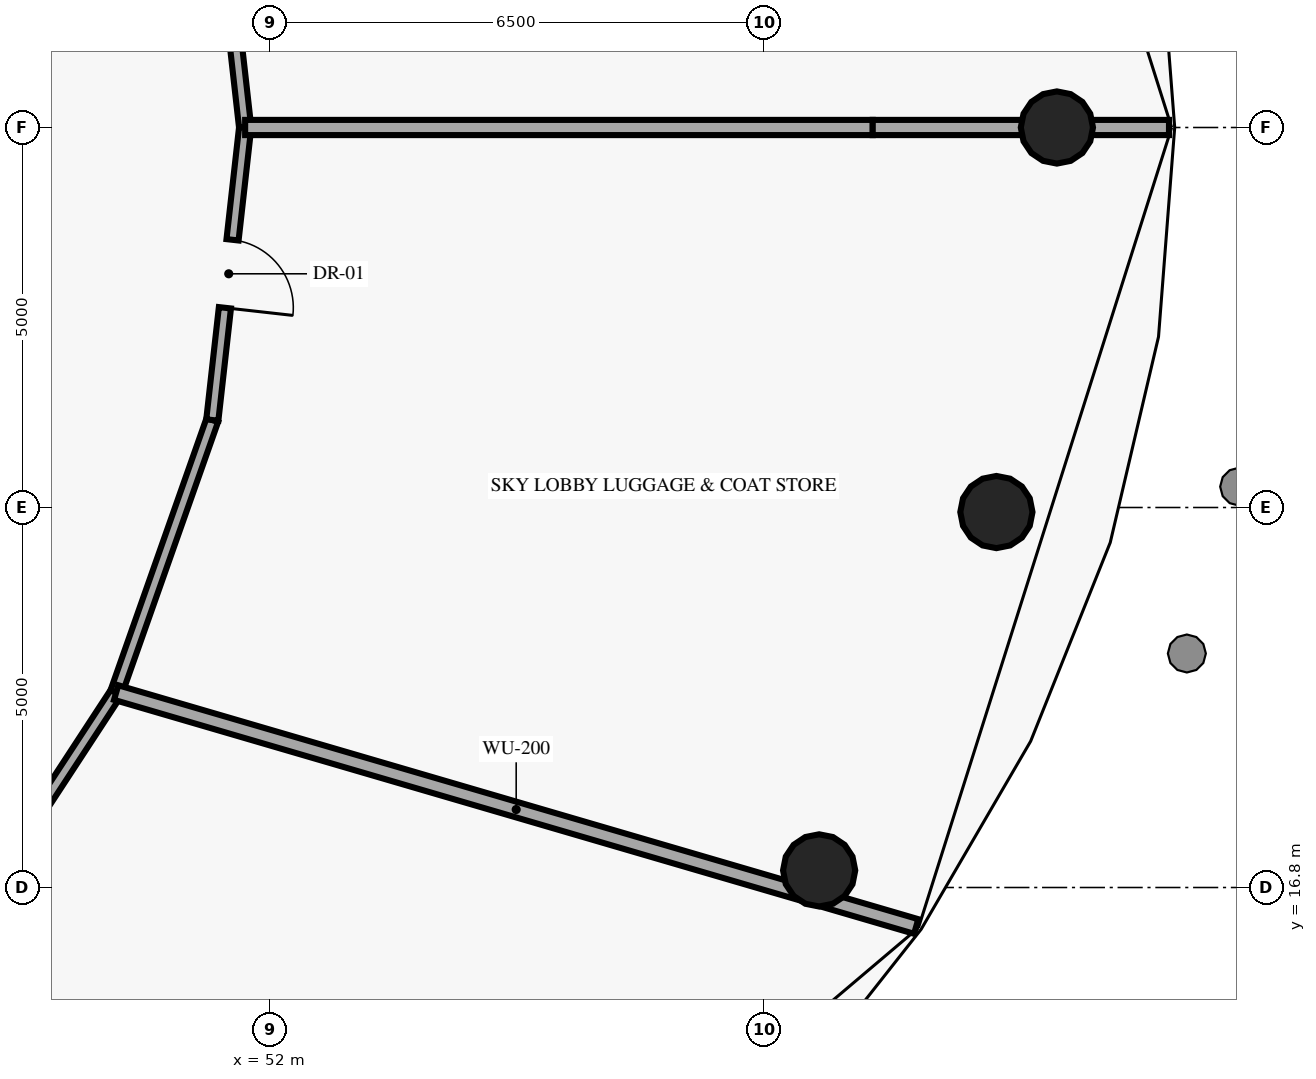
"""IFC4 building model, lengths in metres.
Left out: names, types, materials, properties, quantities, classifications, styles, units other than length and angle.
Written with IfcOpenShell. Run it as: python <this file> out.ifc"""

import sys

from ifc_helpers import new_model, si_unit, direction, frame, frame_2d, origin, origin_2d, place, context, subcontext, project, spatial, rectangle, circle, extrude, element, fill, save


model = new_model("IFC4")
c1 = context("Model", 3, precision=1e-05, world=origin(), true_north=direction((0.0, 1.0)))
c2 = subcontext(c1, "Body", "Model", "MODEL_VIEW")
j1 = project(units=[si_unit("LENGTHUNIT", "METRE"), si_unit("PLANEANGLEUNIT", "RADIAN")], contexts=[c1])
p1 = place(None, origin())
s1 = spatial("IfcSite", under=j1, at=p1, CompositionType="ELEMENT")
p2 = place(p1, origin())
s2 = spatial("IfcBuilding", under=s1, at=p2, CompositionType="ELEMENT")
p3 = place(p2, frame((0.0, 0.0, 113.25)))
s3 = spatial("IfcBuildingStorey", under=s2, at=p3, CompositionType="ELEMENT", Elevation=113.25)
for number, where, z_axis, x_axis in (
    (1, (62.35, 26.8, 0.0), (0.0, 0.0, 1.0), (1.0, 0.0, 0.0)),
    (2, (59.222, 17.025, 0.0), (0.0, 0.0, 1.0), (1.0, 0.0, 0.0)),
    (3, (61.554, 21.74, 0.0), (0.0, 0.0, 1.0), (1.0, 0.0, 0.0)),
):
    element("IfcColumn", number, at=place(p3, frame(where, z_axis=z_axis, x_axis=x_axis)), inside=s3, PredefinedType="COLUMN", context=c2, shape_type="SweptSolid", body=[
        extrude(circle(Radius=0.475, at=origin_2d()), origin(), (0.0, 0.0, 1.0), 4.75),
    ])
p4 = place(p3, frame((51.67, 26.8, 0.0), z_axis=(0.0, 0.0, 1.0), x_axis=(-0.111510761023, 0.993763226416, 0.0)))
e4 = element("IfcWall", 4, at=p4, inside=s3, PredefinedType="PARTITIONING", context=c2, shape_type="SweptSolid", body=[
    extrude(rectangle(XDim=3.873, YDim=0.16, at=frame_2d((1.937, 0.0))), origin(), (0.0, 0.0, 1.0), 4.75),
])
p5 = place(p3, frame((47.959, 16.285, 0.0), z_axis=(0.0, 0.0, 1.0), x_axis=(0.547252937869, 0.836967276537, 0.0)))
e5 = element("IfcWall", 5, at=p5, inside=s3, PredefinedType="PARTITIONING", context=c2, shape_type="SweptSolid", body=[
    extrude(rectangle(XDim=3.68, YDim=0.16, at=frame_2d((1.84, 0.0))), origin(), (0.0, 0.0, 1.0), 4.75),
])
p6 = place(p3, frame((49.973, 19.365, 0.0), z_axis=(0.0, 0.0, 1.0), x_axis=(0.332705930675, 0.943030627124, 0.0)))
e6 = element("IfcWall", 6, at=p6, inside=s3, PredefinedType="PARTITIONING", context=c2, shape_type="SweptSolid", body=[
    extrude(rectangle(XDim=3.802, YDim=0.16, at=frame_2d((1.901, 0.0))), origin(), (0.0, 0.0, 1.0), 4.75),
])
p7 = place(p3, frame((51.67, 26.8, 0.0), z_axis=(0.0, 0.0, 1.0), x_axis=(-0.1115037761, -0.993764010173, 0.0)))
e7 = element("IfcWall", 7, at=p7, inside=s3, PredefinedType="PARTITIONING", context=c2, shape_type="SweptSolid", body=[
    extrude(rectangle(XDim=3.873, YDim=0.16, at=frame_2d((1.937, 0.0))), origin(), (0.0, 0.0, 1.0), 4.75),
])
p8 = place(p7, frame((1.487, 0.0, 0.0)))
e8 = element("IfcOpeningElement", 8, at=p8, cuts=e7, PredefinedType="OPENING", context=c2, shape_type="SweptSolid", body=[
    extrude(rectangle(XDim=0.9, YDim=2.1, at=frame_2d((0.45, 1.05))), frame((0.0, 0.09, 0.0), z_axis=(0.0, -1.0, 0.0), x_axis=(1.0, 0.0, 0.0)), (0.0, 0.0, 1.0), 0.18),
])
p9 = place(p3, frame((51.67, 26.8, 0.0), z_axis=(0.0, 0.0, 1.0), x_axis=(1.0, 0.0, 0.0)))
e9 = element("IfcWall", 9, at=p9, inside=s3, PredefinedType="PARTITIONING", context=c2, shape_type="SweptSolid", body=[
    extrude(rectangle(XDim=8.257, YDim=0.2, at=frame_2d((4.128, 0.0))), origin(), (0.0, 0.0, 1.0), 4.75),
])
p10 = place(p3, frame((59.927, 26.8, 0.0), z_axis=(0.0, 0.0, 1.0), x_axis=(1.0, 0.0, 0.0)))
e10 = element("IfcWall", 10, at=p10, inside=s3, PredefinedType="PARTITIONING", context=c2, shape_type="SweptSolid", body=[
    extrude(rectangle(XDim=2.435, YDim=0.2, at=frame_2d((1.218, 0.0))), origin(), (0.0, 0.0, 1.0), 3.74),
])
p11 = place(p3, frame((62.362, 26.8, 0.0), z_axis=(0.0, 0.0, 1.0), x_axis=(1.0, 0.0, 0.0)))
e11 = element("IfcWall", 11, at=p11, inside=s3, PredefinedType="PARTITIONING", context=c2, shape_type="SweptSolid", body=[
    extrude(rectangle(XDim=1.463, YDim=0.2, at=frame_2d((0.731, 0.0))), origin(), (0.0, 0.0, 1.0), 4.75),
])
p12 = place(p3, frame((49.973, 19.365, 0.0), z_axis=(0.0, 0.0, 1.0), x_axis=(0.959809539565, -0.28065218289, 0.0)))
e12 = element("IfcWall", 12, at=p12, inside=s3, PredefinedType="PARTITIONING", context=c2, shape_type="SweptSolid", body=[
    extrude(rectangle(XDim=10.967, YDim=0.2, at=frame_2d((5.483, 0.0))), origin(), (0.0, 0.0, 1.0), 4.75),
])
p13 = place(p8, origin())
e13 = element("IfcDoor", 13, at=p13, inside=s3, OperationType="SINGLE_SWING_RIGHT", PredefinedType="DOOR", context=c2, shape_type="SweptSolid", body=[
    extrude(rectangle(XDim=0.9, YDim=2.1, at=frame_2d((0.45, 1.05))), frame((0.0, 0.025, 0.0), z_axis=(0.0, -1.0, 0.0), x_axis=(1.0, 0.0, 0.0)), (0.0, 0.0, 1.0), 0.05),
])
fill(e8, e13)
save(model, sys.argv[1])
